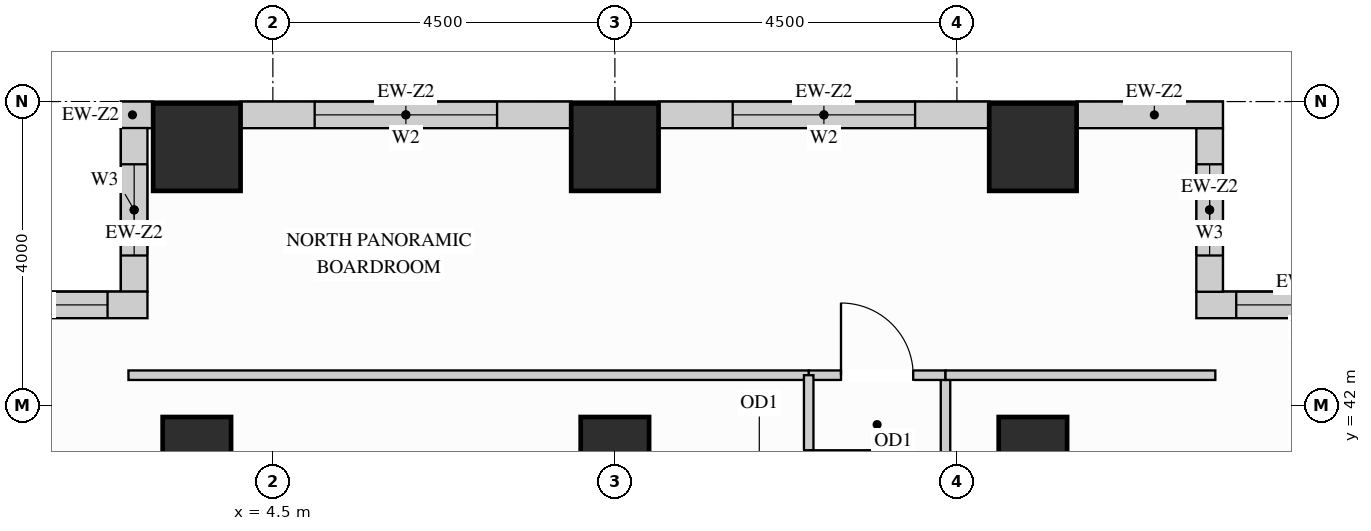
"""IFC4 building model, lengths in metres.
Left out: names, types, materials, properties, quantities, classifications, styles, units other than length and angle.
Written with IfcOpenShell. Run it as: python <this file> out.ifc"""

import sys

from ifc_helpers import new_model, si_unit, direction, frame, frame_2d, origin, origin_2d, place, context, subcontext, project, spatial, rectangle, extrude, source, transform, mapped, element, fill, save


model = new_model("IFC4")
c1 = context("Model", 3, precision=1e-05, world=origin(), true_north=direction((0.0, 1.0)))
c2 = subcontext(c1, "Body", "Model", "MODEL_VIEW")
j1 = project(units=[si_unit("LENGTHUNIT", "METRE"), si_unit("PLANEANGLEUNIT", "RADIAN")], contexts=[c1])
p1 = place(None, origin())
s1 = spatial("IfcSite", under=j1, at=p1, CompositionType="ELEMENT")
p2 = place(p1, origin())
s2 = spatial("IfcBuilding", under=s1, at=p2, CompositionType="ELEMENT")
p3 = place(p2, frame((0.0, 0.0, 91.8)))
s3 = spatial("IfcBuildingStorey", under=s2, at=p3, CompositionType="ELEMENT", Elevation=91.8)
m1 = source(origin(), c2, "Body", "SweptSolid", [
    extrude(rectangle(XDim=0.9, YDim=0.9, at=origin_2d()), origin(), (0.0, 0.0, 1.0), 3.38),
])
for number, where, z_axis, x_axis in (
    (1, (14.5, 41.4, 0.0), (0.0, 0.0, 1.0), (1.0, 0.0, 0.0)),
    (2, (3.5, 41.4, 0.0), (0.0, 0.0, 1.0), (1.0, 0.0, 0.0)),
    (3, (9.0, 41.4, 0.0), (0.0, 0.0, 1.0), (1.0, 0.0, 0.0)),
):
    element("IfcColumn", number, at=place(p3, frame(where, z_axis=z_axis, x_axis=x_axis)), inside=s3, PredefinedType="COLUMN", context=c2, shape_type="MappedRepresentation", body=[
        mapped(m1, transform((0.0, 0.0, 0.0), x_axis=(1.0, 0.0, 0.0), y_axis=(0.0, 1.0, 0.0), z_axis=(0.0, 0.0, 1.0))),
    ])
m2 = source(origin(), c2, "Body", "SweptSolid", [
    extrude(rectangle(XDim=1.15, YDim=1.15, at=origin_2d()), origin(), (0.0, 0.0, 1.0), 3.38),
])
for number, where, z_axis, x_axis in (
    (4, (14.5, 45.4, 0.0), (0.0, 0.0, 1.0), (1.0, 0.0, 0.0)),
    (5, (3.5, 45.4, 0.0), (0.0, 0.0, 1.0), (1.0, 0.0, 0.0)),
    (6, (9.0, 45.4, 0.0), (0.0, 0.0, 1.0), (1.0, 0.0, 0.0)),
):
    element("IfcColumn", number, at=place(p3, frame(where, z_axis=z_axis, x_axis=x_axis)), inside=s3, PredefinedType="COLUMN", context=c2, shape_type="MappedRepresentation", body=[
        mapped(m2, transform((0.0, 0.0, 0.0), x_axis=(1.0, 0.0, 0.0), y_axis=(0.0, 1.0, 0.0), z_axis=(0.0, 0.0, 1.0))),
    ])
p4 = place(p3, frame((19.5, 43.325, 0.0), z_axis=(0.0, 0.0, 1.0), x_axis=(-1.0, 0.0, 0.0)))
e7 = element("IfcWall", 7, at=p4, inside=s3, PredefinedType="SOLIDWALL", context=c2, shape_type="SweptSolid", body=[
    extrude(rectangle(XDim=2.85, YDim=0.35, at=frame_2d((1.425, 0.0))), origin(), (0.0, 0.0, 1.0), 3.365),
])
p5 = place(p4, frame((0.525, 0.0, 0.78)))
e8 = element("IfcOpeningElement", 8, at=p5, cuts=e7, PredefinedType="OPENING", context=c2, shape_type="SweptSolid", body=[
    extrude(rectangle(XDim=1.8, YDim=2.1, at=frame_2d((0.9, 1.05))), frame((0.0, 0.185, 0.0), z_axis=(0.0, -1.0, 0.0), x_axis=(1.0, 0.0, 0.0)), (0.0, 0.0, 1.0), 0.37),
])
p6 = place(p3, frame((16.825, 43.498, 0.0), z_axis=(0.0, 0.0, 1.0), x_axis=(0.0, 1.0, 0.0)))
e9 = element("IfcWall", 9, at=p6, inside=s3, PredefinedType="SOLIDWALL", context=c2, shape_type="SweptSolid", body=[
    extrude(rectangle(XDim=2.154, YDim=0.35, at=frame_2d((1.077, 0.0))), origin(), (0.0, 0.0, 1.0), 3.365),
])
p7 = place(p6, frame((0.477, 0.0, 0.78)))
e10 = element("IfcOpeningElement", 10, at=p7, cuts=e9, PredefinedType="OPENING", context=c2, shape_type="SweptSolid", body=[
    extrude(rectangle(XDim=1.2, YDim=2.1, at=frame_2d((0.6, 1.05))), frame((0.0, 0.185, 0.0), z_axis=(0.0, -1.0, 0.0), x_axis=(1.0, 0.0, 0.0)), (0.0, 0.0, 1.0), 0.37),
])
m3 = source(origin(), c2, "Body", "SweptSolid", [
    extrude(rectangle(XDim=1.927, YDim=0.35, at=frame_2d((0.963, 0.0))), origin(), (0.0, 0.0, 1.0), 3.365),
])
p8 = place(p3, frame((17.0, 45.825, 0.0), z_axis=(0.0, 0.0, 1.0), x_axis=(-1.0, 0.0, 0.0)))
e11 = element("IfcWall", 11, at=p8, inside=s3, PredefinedType="SOLIDWALL", context=c2, shape_type="MappedRepresentation", body=[
    mapped(m3, transform((0.0, 0.0, 0.0), x_axis=(1.0, 0.0, 0.0), y_axis=(0.0, 1.0, 0.0), z_axis=(0.0, 0.0, 1.0))),
])
p9 = place(p3, frame((13.927, 45.825, 0.0), z_axis=(0.0, 0.0, 1.0), x_axis=(-1.0, 0.0, 0.0)))
e12 = element("IfcWall", 12, at=p9, inside=s3, PredefinedType="SOLIDWALL", context=c2, shape_type="SweptSolid", body=[
    extrude(rectangle(XDim=4.354, YDim=0.35, at=frame_2d((2.177, 0.0))), origin(), (0.0, 0.0, 1.0), 3.365),
])
p10 = place(p9, frame((0.977, 0.0, 0.78)))
e13 = element("IfcOpeningElement", 13, at=p10, cuts=e12, PredefinedType="OPENING", context=c2, shape_type="SweptSolid", body=[
    extrude(rectangle(XDim=2.4, YDim=2.1, at=frame_2d((1.2, 1.05))), frame((0.0, 0.185, 0.0), z_axis=(0.0, -1.0, 0.0), x_axis=(1.0, 0.0, 0.0)), (0.0, 0.0, 1.0), 0.37),
])
p11 = place(p3, frame((8.427, 45.825, 0.0), z_axis=(0.0, 0.0, 1.0), x_axis=(-1.0, 0.0, 0.0)))
e14 = element("IfcWall", 14, at=p11, inside=s3, PredefinedType="SOLIDWALL", context=c2, shape_type="SweptSolid", body=[
    extrude(rectangle(XDim=4.354, YDim=0.35, at=frame_2d((2.177, 0.0))), origin(), (0.0, 0.0, 1.0), 3.365),
])
p12 = place(p11, frame((0.977, 0.0, 0.78)))
e15 = element("IfcOpeningElement", 15, at=p12, cuts=e14, PredefinedType="OPENING", context=c2, shape_type="SweptSolid", body=[
    extrude(rectangle(XDim=2.4, YDim=2.1, at=frame_2d((1.2, 1.05))), frame((0.0, 0.185, 0.0), z_axis=(0.0, -1.0, 0.0), x_axis=(1.0, 0.0, 0.0)), (0.0, 0.0, 1.0), 0.37),
])
m4 = source(origin(), c2, "Body", "SweptSolid", [
    extrude(rectangle(XDim=0.427, YDim=0.35, at=frame_2d((0.213, 0.0))), origin(), (0.0, 0.0, 1.0), 3.365),
])
p13 = place(p3, frame((2.927, 45.825, 0.0), z_axis=(0.0, 0.0, 1.0), x_axis=(-1.0, 0.0, 0.0)))
e16 = element("IfcWall", 16, at=p13, inside=s3, PredefinedType="SOLIDWALL", context=c2, shape_type="MappedRepresentation", body=[
    mapped(m4, transform((0.0, 0.0, 0.0), x_axis=(1.0, 0.0, 0.0), y_axis=(0.0, 1.0, 0.0), z_axis=(0.0, 0.0, 1.0))),
])
p14 = place(p3, frame((2.675, 45.652, 0.0), z_axis=(0.0, 0.0, 1.0), x_axis=(0.0, -1.0, 0.0)))
e17 = element("IfcWall", 17, at=p14, inside=s3, PredefinedType="SOLIDWALL", context=c2, shape_type="SweptSolid", body=[
    extrude(rectangle(XDim=2.154, YDim=0.35, at=frame_2d((1.077, 0.0))), origin(), (0.0, 0.0, 1.0), 3.365),
])
p15 = place(p14, frame((0.477, 0.0, 0.78)))
e18 = element("IfcOpeningElement", 18, at=p15, cuts=e17, PredefinedType="OPENING", context=c2, shape_type="SweptSolid", body=[
    extrude(rectangle(XDim=1.2, YDim=2.1, at=frame_2d((0.6, 1.05))), frame((0.0, 0.185, 0.0), z_axis=(0.0, -1.0, 0.0), x_axis=(1.0, 0.0, 0.0)), (0.0, 0.0, 1.0), 0.37),
])
p16 = place(p3, frame((2.85, 43.325, 0.0), z_axis=(0.0, 0.0, 1.0), x_axis=(-1.0, 0.0, 0.0)))
e19 = element("IfcWall", 19, at=p16, inside=s3, PredefinedType="SOLIDWALL", context=c2, shape_type="SweptSolid", body=[
    extrude(rectangle(XDim=2.85, YDim=0.35, at=frame_2d((1.425, 0.0))), origin(), (0.0, 0.0, 1.0), 3.365),
])
p17 = place(p16, frame((0.525, 0.0, 0.78)))
e20 = element("IfcOpeningElement", 20, at=p17, cuts=e19, PredefinedType="OPENING", context=c2, shape_type="SweptSolid", body=[
    extrude(rectangle(XDim=1.8, YDim=2.1, at=frame_2d((0.9, 1.05))), frame((0.0, 0.185, 0.0), z_axis=(0.0, -1.0, 0.0), x_axis=(1.0, 0.0, 0.0)), (0.0, 0.0, 1.0), 0.37),
])
p18 = place(p3, frame((13.35, 37.33, 0.0), z_axis=(0.0, 0.0, 1.0), x_axis=(0.0, 1.0, 0.0)))
e21 = element("IfcWall", 21, at=p18, inside=s3, PredefinedType="PARTITIONING", context=c2, shape_type="SweptSolid", body=[
    extrude(rectangle(XDim=5.07, YDim=0.125, at=frame_2d((2.535, 0.0))), origin(), (0.0, 0.0, 1.0), 3.365),
])
p19 = place(p18, frame((2.06, 0.0, 0.0)))
e22 = element("IfcOpeningElement", 22, at=p19, cuts=e21, PredefinedType="OPENING", context=c2, shape_type="SweptSolid", body=[
    extrude(rectangle(XDim=0.95, YDim=2.15, at=frame_2d((0.475, 1.075))), frame((0.0, 0.073, 0.0), z_axis=(0.0, -1.0, 0.0), x_axis=(1.0, 0.0, 0.0)), (0.0, 0.0, 1.0), 0.145),
])
p20 = place(p3, frame((11.55, 42.4, 0.0), z_axis=(0.0, 0.0, 1.0), x_axis=(1.0, 0.0, 0.0)))
e23 = element("IfcWall", 23, at=p20, inside=s3, PredefinedType="PARTITIONING", context=c2, shape_type="SweptSolid", body=[
    extrude(rectangle(XDim=1.8, YDim=0.125, at=frame_2d((0.9, 0.0))), origin(), (0.0, 0.0, 1.0), 3.365),
])
p21 = place(p20, frame((0.425, 0.0, 0.0)))
e24 = element("IfcOpeningElement", 24, at=p21, cuts=e23, PredefinedType="OPENING", context=c2, shape_type="SweptSolid", body=[
    extrude(rectangle(XDim=0.95, YDim=2.15, at=frame_2d((0.475, 1.075))), frame((0.0, 0.073, 0.0), z_axis=(0.0, -1.0, 0.0), x_axis=(1.0, 0.0, 0.0)), (0.0, 0.0, 1.0), 0.145),
])
m5 = source(origin(), c2, "Body", "SweptSolid", [
    extrude(rectangle(XDim=3.55, YDim=0.125, at=frame_2d((1.775, 0.0))), origin(), (0.0, 0.0, 1.0), 3.365),
])
p22 = place(p3, frame((13.35, 42.4, 0.0), z_axis=(0.0, 0.0, 1.0), x_axis=(1.0, 0.0, 0.0)))
e25 = element("IfcWall", 25, at=p22, inside=s3, PredefinedType="PARTITIONING", context=c2, shape_type="MappedRepresentation", body=[
    mapped(m5, transform((0.0, 0.0, 0.0), x_axis=(1.0, 0.0, 0.0), y_axis=(0.0, 1.0, 0.0), z_axis=(0.0, 0.0, 1.0))),
])
m6 = source(origin(), c2, "Body", "SweptSolid", [
    extrude(rectangle(XDim=8.95, YDim=0.125, at=frame_2d((4.475, 0.0))), origin(), (0.0, 0.0, 1.0), 3.365),
])
p23 = place(p3, frame((2.6, 42.4, 0.0), z_axis=(0.0, 0.0, 1.0), x_axis=(1.0, 0.0, 0.0)))
e26 = element("IfcWall", 26, at=p23, inside=s3, PredefinedType="PARTITIONING", context=c2, shape_type="MappedRepresentation", body=[
    mapped(m6, transform((0.0, 0.0, 0.0), x_axis=(1.0, 0.0, 0.0), y_axis=(0.0, 1.0, 0.0), z_axis=(0.0, 0.0, 1.0))),
])
p24 = place(p3, frame((11.55, 39.475, 0.0), z_axis=(0.0, 0.0, 1.0), x_axis=(0.0, 1.0, 0.0)))
e27 = element("IfcWall", 27, at=p24, inside=s3, PredefinedType="PARTITIONING", context=c2, shape_type="SweptSolid", body=[
    extrude(rectangle(XDim=2.925, YDim=0.125, at=frame_2d((1.462, 0.0))), origin(), (0.0, 0.0, 1.0), 3.365),
])
p25 = place(p24, frame((0.988, 0.0, 0.0)))
e28 = element("IfcOpeningElement", 28, at=p25, cuts=e27, PredefinedType="OPENING", context=c2, shape_type="SweptSolid", body=[
    extrude(rectangle(XDim=0.95, YDim=2.15, at=frame_2d((0.475, 1.075))), frame((0.0, 0.073, 0.0), z_axis=(0.0, -1.0, 0.0), x_axis=(1.0, 0.0, 0.0)), (0.0, 0.0, 1.0), 0.145),
])
m7 = source(origin(), c2, "Body", "SweptSolid", [
    extrude(rectangle(XDim=0.95, YDim=2.15, at=frame_2d((0.475, 1.075))), frame((0.0, 0.025, 0.0), z_axis=(0.0, -1.0, 0.0), x_axis=(1.0, 0.0, 0.0)), (0.0, 0.0, 1.0), 0.05),
])
p26 = place(p21, origin())
e29 = element("IfcDoor", 29, at=p26, inside=s3, OperationType="SINGLE_SWING_LEFT", PredefinedType="DOOR", context=c2, shape_type="MappedRepresentation", body=[
    mapped(m7, transform((0.0, 0.0, 0.0), x_axis=(1.0, 0.0, 0.0), y_axis=(0.0, 1.0, 0.0), z_axis=(0.0, 0.0, 1.0))),
])
fill(e24, e29)
p27 = place(p25, origin())
e30 = element("IfcDoor", 30, at=p27, inside=s3, OperationType="SINGLE_SWING_RIGHT", PredefinedType="DOOR", context=c2, shape_type="MappedRepresentation", body=[
    mapped(m7, transform((0.0, 0.0, 0.0), x_axis=(1.0, 0.0, 0.0), y_axis=(0.0, 1.0, 0.0), z_axis=(0.0, 0.0, 1.0))),
])
fill(e28, e30)
m8 = source(origin(), c2, "Body", "SweptSolid", [
    extrude(rectangle(XDim=1.8, YDim=2.1, at=frame_2d((0.9, 1.05))), frame((0.0, 0.03, 0.0), z_axis=(0.0, -1.0, 0.0), x_axis=(1.0, 0.0, 0.0)), (0.0, 0.0, 1.0), 0.06),
])
p28 = place(p5, origin())
e31 = element("IfcWindow", 31, at=p28, inside=s3, PartitioningType="SINGLE_PANEL", PredefinedType="WINDOW", context=c2, shape_type="MappedRepresentation", body=[
    mapped(m8, transform((0.0, 0.0, 0.0), x_axis=(1.0, 0.0, 0.0), y_axis=(0.0, 1.0, 0.0), z_axis=(0.0, 0.0, 1.0))),
])
fill(e8, e31)
p29 = place(p17, origin())
e32 = element("IfcWindow", 32, at=p29, inside=s3, PartitioningType="SINGLE_PANEL", PredefinedType="WINDOW", context=c2, shape_type="MappedRepresentation", body=[
    mapped(m8, transform((0.0, 0.0, 0.0), x_axis=(1.0, 0.0, 0.0), y_axis=(0.0, 1.0, 0.0), z_axis=(0.0, 0.0, 1.0))),
])
fill(e20, e32)
m9 = source(origin(), c2, "Body", "SweptSolid", [
    extrude(rectangle(XDim=2.4, YDim=2.1, at=frame_2d((1.2, 1.05))), frame((0.0, 0.03, 0.0), z_axis=(0.0, -1.0, 0.0), x_axis=(1.0, 0.0, 0.0)), (0.0, 0.0, 1.0), 0.06),
])
p30 = place(p10, origin())
e33 = element("IfcWindow", 33, at=p30, inside=s3, PartitioningType="SINGLE_PANEL", PredefinedType="WINDOW", context=c2, shape_type="MappedRepresentation", body=[
    mapped(m9, transform((0.0, 0.0, 0.0), x_axis=(1.0, 0.0, 0.0), y_axis=(0.0, 1.0, 0.0), z_axis=(0.0, 0.0, 1.0))),
])
fill(e13, e33)
p31 = place(p12, origin())
e34 = element("IfcWindow", 34, at=p31, inside=s3, PartitioningType="SINGLE_PANEL", PredefinedType="WINDOW", context=c2, shape_type="MappedRepresentation", body=[
    mapped(m9, transform((0.0, 0.0, 0.0), x_axis=(1.0, 0.0, 0.0), y_axis=(0.0, 1.0, 0.0), z_axis=(0.0, 0.0, 1.0))),
])
fill(e15, e34)
m10 = source(origin(), c2, "Body", "SweptSolid", [
    extrude(rectangle(XDim=1.2, YDim=2.1, at=frame_2d((0.6, 1.05))), frame((0.0, 0.03, 0.0), z_axis=(0.0, -1.0, 0.0), x_axis=(1.0, 0.0, 0.0)), (0.0, 0.0, 1.0), 0.06),
])
p32 = place(p7, origin())
e35 = element("IfcWindow", 35, at=p32, inside=s3, PartitioningType="SINGLE_PANEL", PredefinedType="WINDOW", context=c2, shape_type="MappedRepresentation", body=[
    mapped(m10, transform((0.0, 0.0, 0.0), x_axis=(1.0, 0.0, 0.0), y_axis=(0.0, 1.0, 0.0), z_axis=(0.0, 0.0, 1.0))),
])
fill(e10, e35)
p33 = place(p15, origin())
e36 = element("IfcWindow", 36, at=p33, inside=s3, PartitioningType="SINGLE_PANEL", PredefinedType="WINDOW", context=c2, shape_type="MappedRepresentation", body=[
    mapped(m10, transform((0.0, 0.0, 0.0), x_axis=(1.0, 0.0, 0.0), y_axis=(0.0, 1.0, 0.0), z_axis=(0.0, 0.0, 1.0))),
])
fill(e18, e36)
save(model, sys.argv[1])
